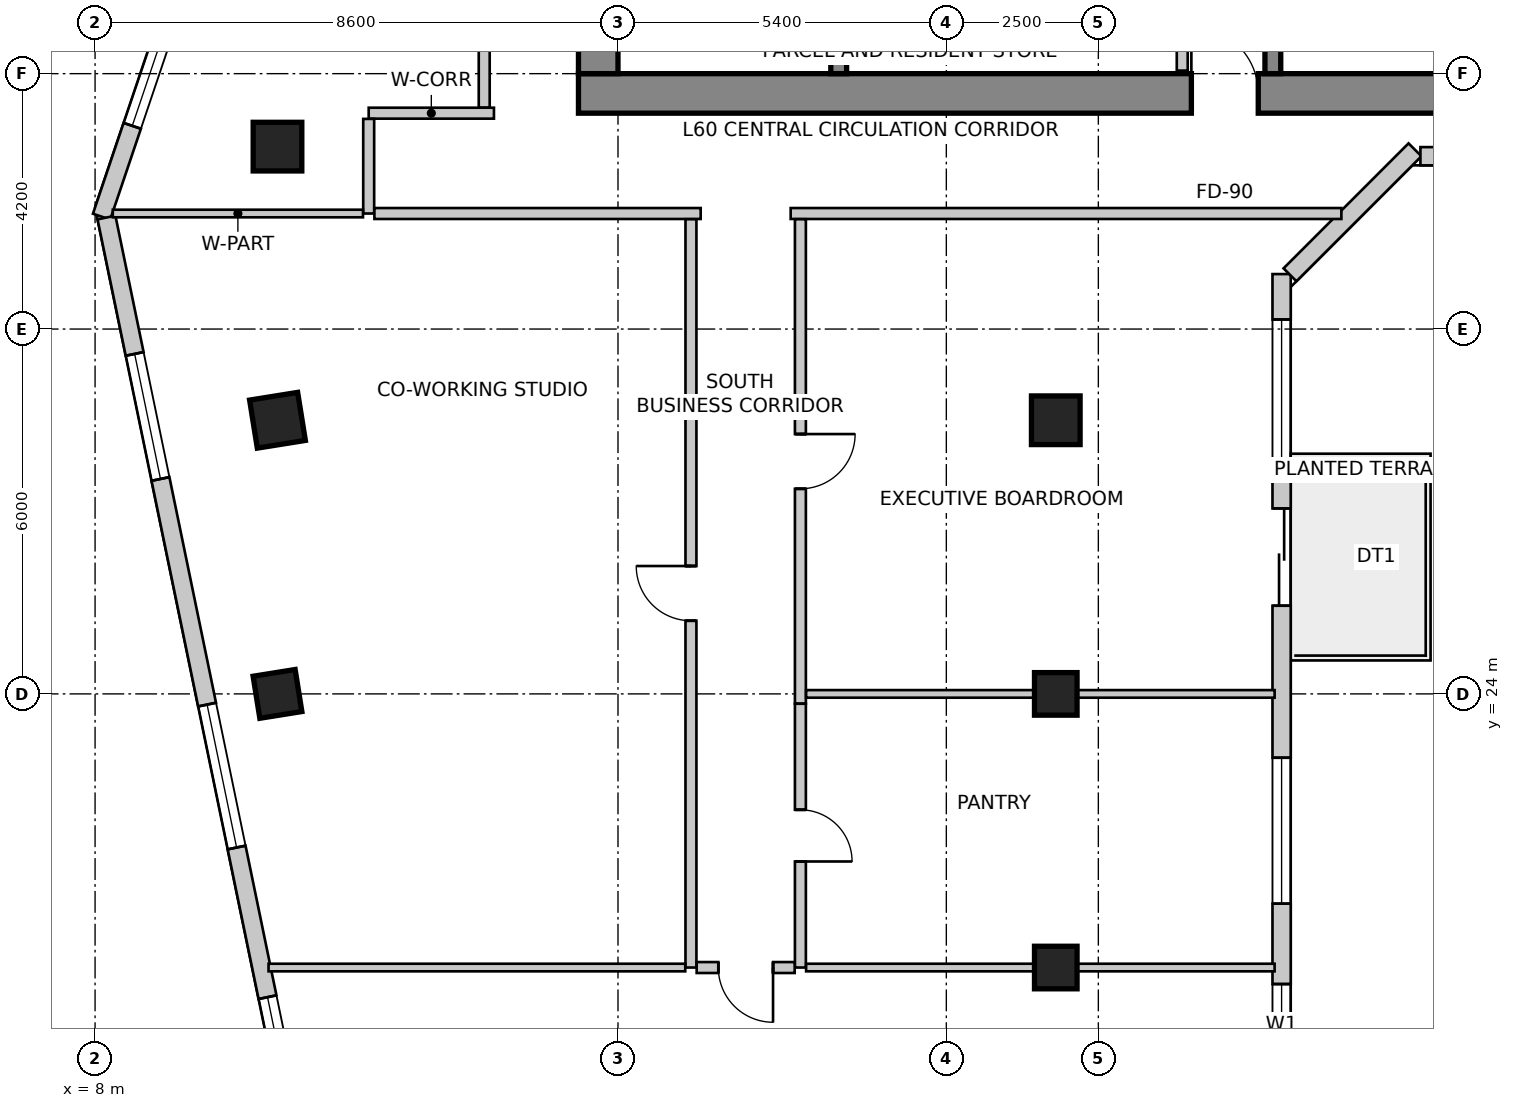
"""IFC4 building model, lengths in metres.
Left out: names, types, materials, properties, quantities, classifications, styles, units other than length and angle.
Written with IfcOpenShell. Run it as: python <this file> out.ifc"""

import sys

from ifc_helpers import new_model, si_unit, direction, frame, frame_2d, origin, origin_2d, place, context, subcontext, project, spatial, rectangle, extrude, source, transform, mapped, element, fill, save


model = new_model("IFC4")
c1 = context("Model", 3, precision=1e-05, world=origin(), true_north=direction((0.0, 1.0)))
c2 = subcontext(c1, "Body", "Model", "MODEL_VIEW")
j1 = project(units=[si_unit("LENGTHUNIT", "METRE"), si_unit("PLANEANGLEUNIT", "RADIAN")], contexts=[c1])
p1 = place(None, origin())
s1 = spatial("IfcSite", under=j1, at=p1, CompositionType="ELEMENT")
p2 = place(p1, origin())
s2 = spatial("IfcBuilding", under=s1, at=p2, CompositionType="ELEMENT")
p3 = place(p2, frame((0.0, 0.0, 235.9)))
s3 = spatial("IfcBuildingStorey", under=s2, at=p3, CompositionType="ELEMENT", Elevation=235.9)
p4 = place(p3, frame((15.95, 33.875, 0.0), z_axis=(0.0, 0.0, 1.0), x_axis=(1.0, 0.0, 0.0)))
e1 = element("IfcWall", 1, at=p4, inside=s3, PredefinedType="SHEAR", context=c2, shape_type="SweptSolid", body=[
    extrude(rectangle(XDim=15.7, YDim=0.65, at=frame_2d((7.85, 0.0))), origin(), (0.0, 0.0, 1.0), 3.5),
])
m1 = source(origin(), c2, "Body", "SweptSolid", [
    extrude(rectangle(XDim=1.1, YDim=2.15, at=frame_2d((0.55, 1.075))), frame((0.0, 0.335, 0.0), z_axis=(0.0, -1.0, 0.0), x_axis=(1.0, 0.0, 0.0)), (0.0, 0.0, 1.0), 0.67),
])
p5 = place(p4, frame((10.08, 0.0, 0.0)))
e2 = element("IfcOpeningElement", 2, at=p5, cuts=e1, PredefinedType="OPENING", context=c2, shape_type="MappedRepresentation", body=[
    mapped(m1, transform((0.0, 0.0, 0.0), scale=1.0)),
])
p6 = place(p3, frame((16.275, 34.2, 0.0), z_axis=(0.0, 0.0, 1.0), x_axis=(0.0, 1.0, 0.0)))
e3 = element("IfcWall", 3, at=p6, inside=s3, PredefinedType="SHEAR", context=c2, shape_type="SweptSolid", body=[
    extrude(rectangle(XDim=11.4, YDim=0.65, at=frame_2d((5.7, 0.0))), origin(), (0.0, 0.0, 1.0), 3.5),
])
p7 = place(p6, frame((7.15, 0.0, 0.0)))
e4 = element("IfcOpeningElement", 4, at=p7, cuts=e3, PredefinedType="OPENING", context=c2, shape_type="MappedRepresentation", body=[
    mapped(m1, transform((0.0, 0.0, 0.0), scale=1.0)),
])
p8 = place(p3, frame((20.23, 34.2, 0.0), z_axis=(0.0, 0.0, 1.0), x_axis=(0.0, 1.0, 0.0)))
e5 = element("IfcWall", 5, at=p8, inside=s3, PredefinedType="SHEAR", context=c2, shape_type="SweptSolid", body=[
    extrude(rectangle(XDim=9.06, YDim=0.26, at=frame_2d((4.53, 0.0))), origin(), (0.0, 0.0, 1.0), 3.5),
])
m2 = source(origin(), c2, "Body", "SweptSolid", [
    extrude(rectangle(XDim=1.1, YDim=2.15, at=frame_2d((0.55, 1.075))), frame((0.0, 0.14, 0.0), z_axis=(0.0, -1.0, 0.0), x_axis=(1.0, 0.0, 0.0)), (0.0, 0.0, 1.0), 0.28),
])
p9 = place(p8, frame((7.45, 0.0, 0.0)))
e6 = element("IfcOpeningElement", 6, at=p9, cuts=e5, PredefinedType="OPENING", context=c2, shape_type="MappedRepresentation", body=[
    mapped(m2, transform((0.0, 0.0, 0.0), scale=1.0)),
])
p10 = place(p3, frame((27.37, 34.2, 0.0), z_axis=(0.0, 0.0, 1.0), x_axis=(0.0, 1.0, 0.0)))
e7 = element("IfcWall", 7, at=p10, inside=s3, PredefinedType="SHEAR", context=c2, shape_type="SweptSolid", body=[
    extrude(rectangle(XDim=9.06, YDim=0.26, at=frame_2d((4.53, 0.0))), origin(), (0.0, 0.0, 1.0), 3.5),
])
p11 = place(p10, frame((7.45, 0.0, 0.0)))
e8 = element("IfcOpeningElement", 8, at=p11, cuts=e7, PredefinedType="OPENING", context=c2, shape_type="MappedRepresentation", body=[
    mapped(m2, transform((0.0, 0.0, 0.0), scale=1.0)),
])
m3 = source(origin(), c2, "Body", "SweptSolid", [
    extrude(rectangle(XDim=0.8, YDim=0.8, at=origin_2d()), origin(), (0.0, 0.0, 1.0), 3.5),
])
for number, where, z_axis, x_axis in (
    (9, (11.0, 33.0, 0.0), (0.0, 0.0, 1.0), (1.0, 0.0, 0.0)),
    (10, (11.0, 28.5, 0.0), (0.0, 0.0, 1.0), (0.158, -0.987, 0.0)),
):
    element("IfcColumn", number, at=place(p3, frame(where, z_axis=z_axis, x_axis=x_axis)), inside=s3, PredefinedType="COLUMN", context=c2, shape_type="MappedRepresentation", body=[
        mapped(m3, transform((0.0, 0.0, 0.0), scale=1.0)),
    ])
m4 = source(origin(), c2, "Body", "SweptSolid", [
    extrude(rectangle(XDim=0.7, YDim=0.7, at=origin_2d()), origin(), (0.0, 0.0, 1.0), 3.5),
])
p12 = place(p3, frame((11.0, 24.0, 0.0), z_axis=(0.0, 0.0, 1.0), x_axis=(0.158158067254, -0.987413806751, 0.0)))
e11 = element("IfcColumn", 11, at=p12, inside=s3, PredefinedType="COLUMN", context=c2, shape_type="MappedRepresentation", body=[
    mapped(m4, transform((0.0, 0.0, 0.0), scale=1.0)),
])
p13 = place(p3, frame((23.8, 28.5, 0.0), z_axis=(0.0, 0.0, 1.0), x_axis=(1.0, 0.0, 0.0)))
e12 = element("IfcColumn", 12, at=p13, inside=s3, PredefinedType="COLUMN", context=c2, shape_type="MappedRepresentation", body=[
    mapped(m3, transform((0.0, 0.0, 0.0), scale=1.0)),
])
for number, where, z_axis, x_axis in (
    (13, (23.8, 24.0, 0.0), (0.0, 0.0, 1.0), (1.0, 0.0, 0.0)),
    (14, (23.8, 19.5, 0.0), (0.0, 0.0, 1.0), (1.0, 0.0, 0.0)),
):
    element("IfcColumn", number, at=place(p3, frame(where, z_axis=z_axis, x_axis=x_axis)), inside=s3, PredefinedType="COLUMN", context=c2, shape_type="MappedRepresentation", body=[
        mapped(m4, transform((0.0, 0.0, 0.0), scale=1.0)),
    ])
p14 = place(p3, frame((27.514, 16.457, 0.0), z_axis=(0.0, 0.0, 1.0), x_axis=(0.0, 1.0, 0.0)))
e15 = element("IfcWall", 15, at=p14, inside=s3, PredefinedType="SOLIDWALL", context=c2, shape_type="SweptSolid", body=[
    extrude(rectangle(XDim=14.447, YDim=0.3, at=frame_2d((7.223, 0.0))), origin(), (0.0, 0.0, 1.0), 3.25),
])
m5 = source(origin(), c2, "Body", "SweptSolid", [
    extrude(rectangle(XDim=1.6, YDim=2.15, at=frame_2d((0.8, 1.075))), frame((0.0, 0.16, 0.0), z_axis=(0.0, -1.0, 0.0), x_axis=(1.0, 0.0, 0.0)), (0.0, 0.0, 1.0), 0.32),
])
p15 = place(p14, frame((8.993, 0.0, 0.0)))
e16 = element("IfcOpeningElement", 16, at=p15, cuts=e15, PredefinedType="OPENING", context=c2, shape_type="MappedRepresentation", body=[
    mapped(m5, transform((0.0, 0.0, 0.0), scale=1.0)),
])
m6 = source(origin(), c2, "Body", "SweptSolid", [
    extrude(rectangle(XDim=2.4, YDim=2.2, at=frame_2d((1.2, 1.1))), frame((0.0, 0.16, 0.0), z_axis=(0.0, -1.0, 0.0), x_axis=(1.0, 0.0, 0.0)), (0.0, 0.0, 1.0), 0.32),
])
p16 = place(p14, frame((0.371, 0.0, 0.85)))
e17 = element("IfcOpeningElement", 17, at=p16, cuts=e15, PredefinedType="OPENING", context=c2, shape_type="MappedRepresentation", body=[
    mapped(m6, transform((0.0, 0.0, 0.0), scale=1.0)),
])
p17 = place(p14, frame((4.093, 0.0, 0.85)))
e18 = element("IfcOpeningElement", 18, at=p17, cuts=e15, PredefinedType="OPENING", context=c2, shape_type="MappedRepresentation", body=[
    mapped(m6, transform((0.0, 0.0, 0.0), scale=1.0)),
])
p18 = place(p14, frame((11.3, 0.0, 0.85)))
e19 = element("IfcOpeningElement", 19, at=p18, cuts=e15, PredefinedType="OPENING", context=c2, shape_type="MappedRepresentation", body=[
    mapped(m6, transform((0.0, 0.0, 0.0), scale=1.0)),
])
p19 = place(p3, frame((27.652, 30.892, 0.0), z_axis=(0.0, 0.0, 1.0), x_axis=(0.707106781187, 0.707106781187, 0.0)))
e20 = element("IfcWall", 20, at=p19, inside=s3, PredefinedType="SOLIDWALL", context=c2, shape_type="SweptSolid", body=[
    extrude(rectangle(XDim=2.907, YDim=0.3, at=frame_2d((1.454, 0.0))), origin(), (0.0, 0.0, 1.0), 3.25),
])
p20 = place(p3, frame((29.797, 32.842, 0.0), z_axis=(0.0, 0.0, 1.0), x_axis=(1.0, 0.0, 0.0)))
e21 = element("IfcWall", 21, at=p20, inside=s3, PredefinedType="SOLIDWALL", context=c2, shape_type="SweptSolid", body=[
    extrude(rectangle(XDim=0.882, YDim=0.3, at=frame_2d((0.441, 0.0))), origin(), (0.0, 0.0, 1.0), 3.25),
])
p21 = place(p3, frame((13.269, 47.134, 0.0), z_axis=(0.0, 0.0, 1.0), x_axis=(-0.319920776449, -0.947444297464, 0.0)))
e22 = element("IfcWall", 22, at=p21, inside=s3, PredefinedType="SOLIDWALL", context=c2, shape_type="SweptSolid", body=[
    extrude(rectangle(XDim=16.133, YDim=0.3, at=frame_2d((8.067, 0.0))), origin(), (0.0, 0.0, 1.0), 3.25),
])
p22 = place(p21, frame((2.363, 0.0, 0.85)))
e23 = element("IfcOpeningElement", 23, at=p22, cuts=e22, PredefinedType="OPENING", context=c2, shape_type="MappedRepresentation", body=[
    mapped(m6, transform((0.0, 0.0, 0.0), scale=1.0)),
])
m7 = source(origin(), c2, "Body", "SweptSolid", [
    extrude(rectangle(XDim=2.1, YDim=2.0, at=frame_2d((1.05, 1.0))), frame((0.0, 0.16, 0.0), z_axis=(0.0, -1.0, 0.0), x_axis=(1.0, 0.0, 0.0)), (0.0, 0.0, 1.0), 0.32),
])
p23 = place(p21, frame((7.41, 0.0, 0.85)))
e24 = element("IfcOpeningElement", 24, at=p23, cuts=e22, PredefinedType="OPENING", context=c2, shape_type="MappedRepresentation", body=[
    mapped(m7, transform((0.0, 0.0, 0.0), scale=1.0)),
])
p24 = place(p21, frame((12.157, 0.0, 0.85)))
e25 = element("IfcOpeningElement", 25, at=p24, cuts=e22, PredefinedType="OPENING", context=c2, shape_type="MappedRepresentation", body=[
    mapped(m6, transform((0.0, 0.0, 0.0), scale=1.0)),
])
p25 = place(p3, frame((8.188, 31.834, 0.0), z_axis=(0.0, 0.0, 1.0), x_axis=(0.202303475707, -0.979322880217, 0.0)))
e26 = element("IfcWall", 26, at=p25, inside=s3, PredefinedType="SOLIDWALL", context=c2, shape_type="SweptSolid", body=[
    extrude(rectangle(XDim=15.766, YDim=0.3, at=frame_2d((7.883, 0.0))), origin(), (0.0, 0.0, 1.0), 3.25),
])
p26 = place(p25, frame((2.29, 0.0, 0.85)))
e27 = element("IfcOpeningElement", 27, at=p26, cuts=e26, PredefinedType="OPENING", context=c2, shape_type="MappedRepresentation", body=[
    mapped(m7, transform((0.0, 0.0, 0.0), scale=1.0)),
])
p27 = place(p25, frame((8.179, 0.0, 0.85)))
e28 = element("IfcOpeningElement", 28, at=p27, cuts=e26, PredefinedType="OPENING", context=c2, shape_type="MappedRepresentation", body=[
    mapped(m6, transform((0.0, 0.0, 0.0), scale=1.0)),
])
p28 = place(p25, frame((13.092, 0.0, 0.85)))
e29 = element("IfcOpeningElement", 29, at=p28, cuts=e26, PredefinedType="OPENING", context=c2, shape_type="MappedRepresentation", body=[
    mapped(m7, transform((0.0, 0.0, 0.0), scale=1.0)),
])
p29 = place(p3, frame((25.88, 35.956, 0.0), z_axis=(0.0, 0.0, 1.0), x_axis=(0.0, -1.0, 0.0)))
e30 = element("IfcWall", 30, at=p29, inside=s3, PredefinedType="PARTITIONING", context=c2, shape_type="SweptSolid", body=[
    extrude(rectangle(XDim=1.706, YDim=0.18, at=frame_2d((0.853, 0.0))), origin(), (0.0, 0.0, 1.0), 2.542),
])
p30 = place(p3, frame((12.5, 33.55, 0.0), z_axis=(0.0, 0.0, 1.0), x_axis=(1.0, 0.0, 0.0)))
e31 = element("IfcWall", 31, at=p30, inside=s3, PredefinedType="PARTITIONING", context=c2, shape_type="SweptSolid", body=[
    extrude(rectangle(XDim=2.06, YDim=0.18, at=frame_2d((1.03, 0.0))), origin(), (0.0, 0.0, 1.0), 3.25),
])
p31 = place(p3, frame((12.5, 31.9, 0.0), z_axis=(0.0, 0.0, 1.0), x_axis=(0.0, 1.0, 0.0)))
e32 = element("IfcWall", 32, at=p31, inside=s3, PredefinedType="PARTITIONING", context=c2, shape_type="SweptSolid", body=[
    extrude(rectangle(XDim=1.556, YDim=0.18, at=frame_2d((0.778, 0.0))), origin(), (0.0, 0.0, 1.0), 2.835),
])
p32 = place(p3, frame((17.96, 31.9, 0.0), z_axis=(0.0, 0.0, 1.0), x_axis=(-1.0, 0.0, 0.0)))
e33 = element("IfcWall", 33, at=p32, inside=s3, PredefinedType="PARTITIONING", context=c2, shape_type="SweptSolid", body=[
    extrude(rectangle(XDim=5.366, YDim=0.18, at=frame_2d((2.683, 0.0))), origin(), (0.0, 0.0, 1.0), 2.835),
])
p33 = place(p3, frame((28.497, 31.9, 0.0), z_axis=(0.0, 0.0, 1.0), x_axis=(-1.0, 0.0, 0.0)))
e34 = element("IfcWall", 34, at=p33, inside=s3, PredefinedType="PARTITIONING", context=c2, shape_type="SweptSolid", body=[
    extrude(rectangle(XDim=9.057, YDim=0.18, at=frame_2d((4.529, 0.0))), origin(), (0.0, 0.0, 1.0), 2.835),
])
p34 = place(p3, frame((14.4, 33.644, 0.0), z_axis=(0.0, 0.0, 1.0), x_axis=(0.0, 1.0, 0.0)))
e35 = element("IfcWall", 35, at=p34, inside=s3, PredefinedType="PARTITIONING", context=c2, shape_type="SweptSolid", body=[
    extrude(rectangle(XDim=12.606, YDim=0.18, at=frame_2d((6.303, 0.0))), origin(), (0.0, 0.0, 1.0), 3.25),
])
m8 = source(origin(), c2, "Body", "SweptSolid", [
    extrude(rectangle(XDim=0.9, YDim=2.15, at=frame_2d((0.45, 1.075))), frame((0.0, 0.1, 0.0), z_axis=(0.0, -1.0, 0.0), x_axis=(1.0, 0.0, 0.0)), (0.0, 0.0, 1.0), 0.2),
])
p35 = place(p34, frame((4.399, 0.0, 0.0)))
e36 = element("IfcOpeningElement", 36, at=p35, cuts=e35, PredefinedType="OPENING", context=c2, shape_type="MappedRepresentation", body=[
    mapped(m8, transform((0.0, 0.0, 0.0), scale=1.0)),
])
p36 = place(p3, frame((12.406, 31.9, 0.0), z_axis=(0.0, 0.0, 1.0), x_axis=(-1.0, 0.0, 0.0)))
e37 = element("IfcWall", 37, at=p36, inside=s3, PredefinedType="PARTITIONING", context=c2, shape_type="SweptSolid", body=[
    extrude(rectangle(XDim=4.115, YDim=0.125, at=frame_2d((2.057, 0.0))), origin(), (0.0, 0.0, 1.0), 2.542),
])
p37 = place(p3, frame((17.8, 19.5, 0.0), z_axis=(0.0, 0.0, 1.0), x_axis=(0.0, 1.0, 0.0)))
e38 = element("IfcWall", 38, at=p37, inside=s3, PredefinedType="PARTITIONING", context=c2, shape_type="SweptSolid", body=[
    extrude(rectangle(XDim=12.306, YDim=0.18, at=frame_2d((6.153, 0.0))), origin(), (0.0, 0.0, 1.0), 2.688),
])
p38 = place(p37, frame((5.703, 0.0, 0.0)))
e39 = element("IfcOpeningElement", 39, at=p38, cuts=e38, PredefinedType="OPENING", context=c2, shape_type="MappedRepresentation", body=[
    mapped(m8, transform((0.0, 0.0, 0.0), scale=1.0)),
])
p39 = place(p3, frame((19.6, 31.806, 0.0), z_axis=(0.0, 0.0, 1.0), x_axis=(0.0, -1.0, 0.0)))
e40 = element("IfcWall", 40, at=p39, inside=s3, PredefinedType="PARTITIONING", context=c2, shape_type="SweptSolid", body=[
    extrude(rectangle(XDim=7.966, YDim=0.18, at=frame_2d((3.983, 0.0))), origin(), (0.0, 0.0, 1.0), 2.688),
])
p40 = place(p39, frame((3.533, 0.0, 0.0)))
e41 = element("IfcOpeningElement", 41, at=p40, cuts=e40, PredefinedType="OPENING", context=c2, shape_type="MappedRepresentation", body=[
    mapped(m8, transform((0.0, 0.0, 0.0), scale=1.0)),
])
p41 = place(p3, frame((19.6, 23.838, 0.0), z_axis=(0.0, 0.0, 1.0), x_axis=(0.0, -1.0, 0.0)))
e42 = element("IfcWall", 42, at=p41, inside=s3, PredefinedType="PARTITIONING", context=c2, shape_type="SweptSolid", body=[
    extrude(rectangle(XDim=4.338, YDim=0.18, at=frame_2d((2.169, 0.0))), origin(), (0.0, 0.0, 1.0), 2.688),
])
m9 = source(origin(), c2, "Body", "SweptSolid", [
    extrude(rectangle(XDim=0.85, YDim=2.15, at=frame_2d((0.425, 1.075))), frame((0.0, 0.1, 0.0), z_axis=(0.0, -1.0, 0.0), x_axis=(1.0, 0.0, 0.0)), (0.0, 0.0, 1.0), 0.2),
])
p42 = place(p41, frame((1.744, 0.0, 0.0)))
e43 = element("IfcOpeningElement", 43, at=p42, cuts=e42, PredefinedType="OPENING", context=c2, shape_type="MappedRepresentation", body=[
    mapped(m9, transform((0.0, 0.0, 0.0), scale=1.0)),
])
p43 = place(p3, frame((19.506, 19.5, 0.0), z_axis=(0.0, 0.0, 1.0), x_axis=(-1.0, 0.0, 0.0)))
e44 = element("IfcWall", 44, at=p43, inside=s3, PredefinedType="PARTITIONING", context=c2, shape_type="SweptSolid", body=[
    extrude(rectangle(XDim=1.612, YDim=0.18, at=frame_2d((0.806, 0.0))), origin(), (0.0, 0.0, 1.0), 3.25),
])
p44 = place(p43, frame((0.356, 0.0, 0.0)))
e45 = element("IfcOpeningElement", 45, at=p44, cuts=e44, PredefinedType="OPENING", context=c2, shape_type="MappedRepresentation", body=[
    mapped(m8, transform((0.0, 0.0, 0.0), scale=1.0)),
])
p45 = place(p3, frame((17.706, 19.5, 0.0), z_axis=(0.0, 0.0, 1.0), x_axis=(-1.0, 0.0, 0.0)))
e46 = element("IfcWall", 46, at=p45, inside=s3, PredefinedType="PARTITIONING", context=c2, shape_type="SweptSolid", body=[
    extrude(rectangle(XDim=6.853, YDim=0.125, at=frame_2d((3.427, 0.0))), origin(), (0.0, 0.0, 1.0), 3.25),
])
for number, where, z_axis, x_axis in (
    (47, (27.399, 24.0, 0.0), (0.0, 0.0, 1.0), (-1.0, 0.0, 0.0)),
    (48, (27.399, 19.5, 0.0), (0.0, 0.0, 1.0), (-1.0, 0.0, 0.0)),
):
    element("IfcWall", number, at=place(p3, frame(where, z_axis=z_axis, x_axis=x_axis)), inside=s3, PredefinedType="PARTITIONING", context=c2, shape_type="SweptSolid", body=[
        extrude(rectangle(XDim=7.705, YDim=0.125, at=frame_2d((3.853, 0.0))), origin(), (0.0, 0.0, 1.0), 2.542),
    ])
m10 = source(origin(), c2, "Body", "SweptSolid", [
    extrude(rectangle(XDim=1.6, YDim=2.15, at=frame_2d((0.8, 1.075))), frame((0.0, 0.025, 0.0), z_axis=(0.0, -1.0, 0.0), x_axis=(1.0, 0.0, 0.0)), (0.0, 0.0, 1.0), 0.05),
])
p46 = place(p15, origin())
e49 = element("IfcDoor", 49, at=p46, inside=s3, OperationType="DOUBLE_DOOR_SLIDING", PredefinedType="DOOR", context=c2, shape_type="MappedRepresentation", body=[
    mapped(m10, transform((0.0, 0.0, 0.0), scale=1.0)),
])
fill(e16, e49)
m11 = source(origin(), c2, "Body", "SweptSolid", [
    extrude(rectangle(XDim=2.4, YDim=2.2, at=frame_2d((1.2, 1.1))), frame((0.0, -0.015, 0.0), z_axis=(0.0, -1.0, 0.0), x_axis=(1.0, 0.0, 0.0)), (0.0, 0.0, 1.0), 0.06),
])
p47 = place(p16, origin())
e50 = element("IfcWindow", 50, at=p47, inside=s3, PartitioningType="SINGLE_PANEL", PredefinedType="WINDOW", context=c2, shape_type="MappedRepresentation", body=[
    mapped(m11, transform((0.0, 0.0, 0.0), scale=1.0)),
])
fill(e17, e50)
p48 = place(p17, origin())
e51 = element("IfcWindow", 51, at=p48, inside=s3, PartitioningType="SINGLE_PANEL", PredefinedType="WINDOW", context=c2, shape_type="MappedRepresentation", body=[
    mapped(m11, transform((0.0, 0.0, 0.0), scale=1.0)),
])
fill(e18, e51)
p49 = place(p18, origin())
e52 = element("IfcWindow", 52, at=p49, inside=s3, PartitioningType="SINGLE_PANEL", PredefinedType="WINDOW", context=c2, shape_type="MappedRepresentation", body=[
    mapped(m11, transform((0.0, 0.0, 0.0), scale=1.0)),
])
fill(e19, e52)
p50 = place(p24, origin())
e53 = element("IfcWindow", 53, at=p50, inside=s3, PartitioningType="SINGLE_PANEL", PredefinedType="WINDOW", context=c2, shape_type="MappedRepresentation", body=[
    mapped(m11, transform((0.0, 0.0, 0.0), scale=1.0)),
])
fill(e25, e53)
m12 = source(origin(), c2, "Body", "SweptSolid", [
    extrude(rectangle(XDim=2.1, YDim=2.0, at=frame_2d((1.05, 1.0))), frame((0.0, -0.015, 0.0), z_axis=(0.0, -1.0, 0.0), x_axis=(1.0, 0.0, 0.0)), (0.0, 0.0, 1.0), 0.06),
])
p51 = place(p26, origin())
e54 = element("IfcWindow", 54, at=p51, inside=s3, PartitioningType="SINGLE_PANEL", PredefinedType="WINDOW", context=c2, shape_type="MappedRepresentation", body=[
    mapped(m12, transform((0.0, 0.0, 0.0), scale=1.0)),
])
fill(e27, e54)
p52 = place(p27, origin())
e55 = element("IfcWindow", 55, at=p52, inside=s3, PartitioningType="SINGLE_PANEL", PredefinedType="WINDOW", context=c2, shape_type="MappedRepresentation", body=[
    mapped(m11, transform((0.0, 0.0, 0.0), scale=1.0)),
])
fill(e28, e55)
p53 = place(p28, origin())
e56 = element("IfcWindow", 56, at=p53, inside=s3, PartitioningType="SINGLE_PANEL", PredefinedType="WINDOW", context=c2, shape_type="MappedRepresentation", body=[
    mapped(m12, transform((0.0, 0.0, 0.0), scale=1.0)),
])
fill(e29, e56)
m13 = source(origin(), c2, "Body", "SweptSolid", [
    extrude(rectangle(XDim=1.1, YDim=2.15, at=frame_2d((0.55, 1.075))), frame((0.0, 0.025, 0.0), z_axis=(0.0, -1.0, 0.0), x_axis=(1.0, 0.0, 0.0)), (0.0, 0.0, 1.0), 0.05),
])
p54 = place(p5, origin())
e57 = element("IfcDoor", 57, at=p54, inside=s3, OperationType="SINGLE_SWING_LEFT", PredefinedType="DOOR", context=c2, shape_type="MappedRepresentation", body=[
    mapped(m13, transform((0.0, 0.0, 0.0), scale=1.0)),
])
fill(e2, e57)
m14 = source(origin(), c2, "Body", "SweptSolid", [
    extrude(rectangle(XDim=0.9, YDim=2.15, at=frame_2d((0.45, 1.075))), frame((0.0, 0.025, 0.0), z_axis=(0.0, -1.0, 0.0), x_axis=(1.0, 0.0, 0.0)), (0.0, 0.0, 1.0), 0.05),
])
p55 = place(p38, origin())
e58 = element("IfcDoor", 58, at=p55, inside=s3, OperationType="SINGLE_SWING_RIGHT", PredefinedType="DOOR", context=c2, shape_type="MappedRepresentation", body=[
    mapped(m14, transform((0.0, 0.0, 0.0), scale=1.0)),
])
fill(e39, e58)
p56 = place(p40, origin())
e59 = element("IfcDoor", 59, at=p56, inside=s3, OperationType="SINGLE_SWING_LEFT", PredefinedType="DOOR", context=c2, shape_type="MappedRepresentation", body=[
    mapped(m14, transform((0.0, 0.0, 0.0), scale=1.0)),
])
fill(e41, e59)
m15 = source(origin(), c2, "Body", "SweptSolid", [
    extrude(rectangle(XDim=0.85, YDim=2.15, at=frame_2d((0.425, 1.075))), frame((0.0, 0.025, 0.0), z_axis=(0.0, -1.0, 0.0), x_axis=(1.0, 0.0, 0.0)), (0.0, 0.0, 1.0), 0.05),
])
p57 = place(p42, origin())
e60 = element("IfcDoor", 60, at=p57, inside=s3, OperationType="SINGLE_SWING_RIGHT", PredefinedType="DOOR", context=c2, shape_type="MappedRepresentation", body=[
    mapped(m15, transform((0.0, 0.0, 0.0), scale=1.0)),
])
fill(e43, e60)
p58 = place(p44, origin())
e61 = element("IfcDoor", 61, at=p58, inside=s3, OperationType="SINGLE_SWING_LEFT", PredefinedType="DOOR", context=c2, shape_type="MappedRepresentation", body=[
    mapped(m14, transform((0.0, 0.0, 0.0), scale=1.0)),
])
fill(e45, e61)
save(model, sys.argv[1])
